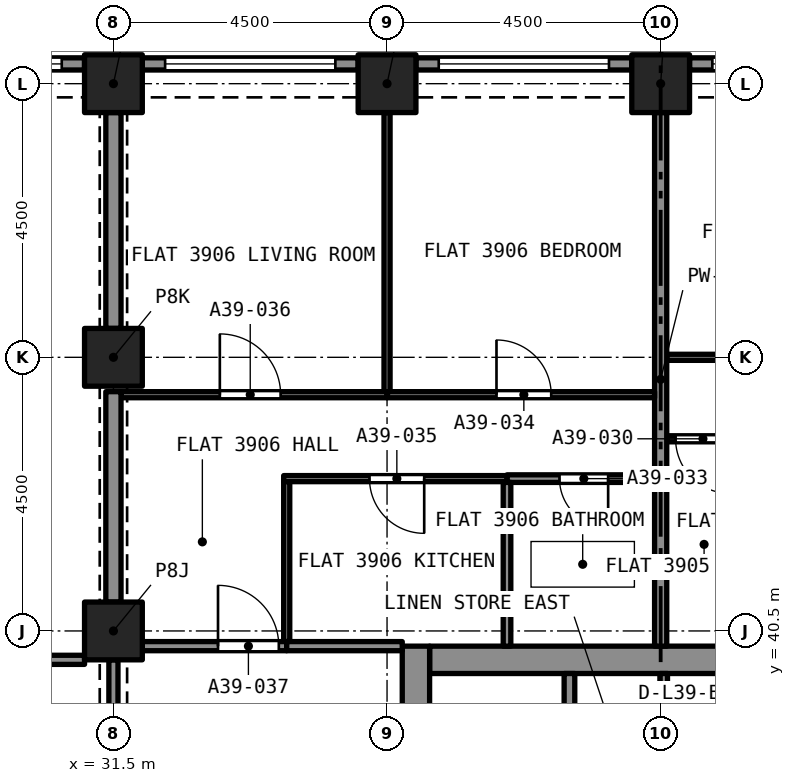
"""IFC4 building model, lengths in metres.
Left out: names, types, materials, properties, quantities, classifications, styles, units other than length and angle.
Written with IfcOpenShell. Run it as: python <this file> out.ifc"""

import sys

from ifc_helpers import new_model, si_unit, direction, frame, frame_2d, origin, origin_2d, place, context, subcontext, project, spatial, rectangle, extrude, element, fill, save


model = new_model("IFC4")
c1 = context("Model", 3, precision=1e-05, world=origin(), true_north=direction((0.0, 1.0)))
c2 = subcontext(c1, "Body", "Model", "MODEL_VIEW")
j1 = project(units=[si_unit("LENGTHUNIT", "METRE"), si_unit("PLANEANGLEUNIT", "RADIAN")], contexts=[c1])
p1 = place(None, origin())
s1 = spatial("IfcSite", under=j1, at=p1, CompositionType="ELEMENT")
p2 = place(p1, origin())
s2 = spatial("IfcBuilding", under=s1, at=p2, CompositionType="ELEMENT")
p3 = place(p2, frame((0.0, 0.0, 139.8)))
s3 = spatial("IfcBuildingStorey", under=s2, at=p3, CompositionType="ELEMENT", Elevation=139.8)
for number, where, z_axis, x_axis in (
    (1, (31.5, 40.5, 0.0), (0.0, 0.0, 1.0), (1.0, 0.0, 0.0)),
    (2, (31.5, 45.0, 0.0), (0.0, 0.0, 1.0), (1.0, 0.0, 0.0)),
    (3, (31.5, 49.5, 0.0), (0.0, 0.0, 1.0), (1.0, 0.0, 0.0)),
    (4, (36.0, 49.5, 0.0), (0.0, 0.0, 1.0), (1.0, 0.0, 0.0)),
    (5, (40.5, 49.5, 0.0), (0.0, 0.0, 1.0), (1.0, 0.0, 0.0)),
):
    element("IfcColumn", number, at=place(p3, frame(where, z_axis=z_axis, x_axis=x_axis)), inside=s3, PredefinedType="COLUMN", context=c2, shape_type="SweptSolid", body=[
        extrude(rectangle(XDim=0.95, YDim=0.95, at=origin_2d()), origin(), (0.0, 0.0, 1.0), 3.2),
    ])
p4 = place(p3, frame((36.7, 40.025, 0.0), z_axis=(0.0, 0.0, 1.0), x_axis=(1.0, 0.0, 0.0)))
e6 = element("IfcWall", 6, at=p4, inside=s3, PredefinedType="SOLIDWALL", context=c2, shape_type="SweptSolid", body=[
    extrude(rectangle(XDim=7.6, YDim=0.45, at=frame_2d((3.8, 0.0))), origin(), (0.0, 0.0, 1.0), 3.2),
])
p5 = place(p3, frame((36.475, 27.25, 0.0), z_axis=(0.0, 0.0, 1.0), x_axis=(0.0, 1.0, 0.0)))
e7 = element("IfcWall", 7, at=p5, inside=s3, PredefinedType="SOLIDWALL", context=c2, shape_type="SweptSolid", body=[
    extrude(rectangle(XDim=13.0, YDim=0.45, at=frame_2d((6.5, 0.0))), origin(), (0.0, 0.0, 1.0), 3.2),
])
p6 = place(p5, frame((8.7, 0.0, 0.0)))
e8 = element("IfcOpeningElement", 8, at=p6, cuts=e7, PredefinedType="OPENING", context=c2, shape_type="SweptSolid", body=[
    extrude(rectangle(XDim=1.2, YDim=2.1, at=frame_2d((0.6, 1.05))), frame((0.0, 0.235, 0.0), z_axis=(0.0, -1.0, 0.0), x_axis=(1.0, 0.0, 0.0)), (0.0, 0.0, 1.0), 0.47),
])
p7 = place(p3, frame((40.975, 49.825, 0.0), z_axis=(0.0, 0.0, 1.0), x_axis=(1.0, 0.0, 0.0)))
e9 = element("IfcWall", 9, at=p7, inside=s3, PredefinedType="SOLIDWALL", context=c2, shape_type="SweptSolid", body=[
    extrude(rectangle(XDim=3.55, YDim=0.2, at=frame_2d((1.775, 0.0))), origin(), (0.0, 0.0, 1.0), 3.2),
])
p8 = place(p7, frame((0.375, 0.0, 0.45)))
e10 = element("IfcOpeningElement", 10, at=p8, cuts=e9, PredefinedType="OPENING", context=c2, shape_type="SweptSolid", body=[
    extrude(rectangle(XDim=2.8, YDim=1.95, at=frame_2d((1.4, 0.975))), frame((0.0, 0.11, 0.0), z_axis=(0.0, -1.0, 0.0), x_axis=(1.0, 0.0, 0.0)), (0.0, 0.0, 1.0), 0.22),
])
p9 = place(p3, frame((36.475, 49.825, 0.0), z_axis=(0.0, 0.0, 1.0), x_axis=(1.0, 0.0, 0.0)))
e11 = element("IfcWall", 11, at=p9, inside=s3, PredefinedType="SOLIDWALL", context=c2, shape_type="SweptSolid", body=[
    extrude(rectangle(XDim=3.55, YDim=0.2, at=frame_2d((1.775, 0.0))), origin(), (0.0, 0.0, 1.0), 3.2),
])
p10 = place(p9, frame((0.375, 0.0, 0.45)))
e12 = element("IfcOpeningElement", 12, at=p10, cuts=e11, PredefinedType="OPENING", context=c2, shape_type="SweptSolid", body=[
    extrude(rectangle(XDim=2.8, YDim=1.95, at=frame_2d((1.4, 0.975))), frame((0.0, 0.11, 0.0), z_axis=(0.0, -1.0, 0.0), x_axis=(1.0, 0.0, 0.0)), (0.0, 0.0, 1.0), 0.22),
])
p11 = place(p3, frame((31.975, 49.825, 0.0), z_axis=(0.0, 0.0, 1.0), x_axis=(1.0, 0.0, 0.0)))
e13 = element("IfcWall", 13, at=p11, inside=s3, PredefinedType="SOLIDWALL", context=c2, shape_type="SweptSolid", body=[
    extrude(rectangle(XDim=3.55, YDim=0.2, at=frame_2d((1.775, 0.0))), origin(), (0.0, 0.0, 1.0), 3.2),
])
p12 = place(p11, frame((0.375, 0.0, 0.45)))
e14 = element("IfcOpeningElement", 14, at=p12, cuts=e13, PredefinedType="OPENING", context=c2, shape_type="SweptSolid", body=[
    extrude(rectangle(XDim=2.8, YDim=1.95, at=frame_2d((1.4, 0.975))), frame((0.0, 0.11, 0.0), z_axis=(0.0, -1.0, 0.0), x_axis=(1.0, 0.0, 0.0)), (0.0, 0.0, 1.0), 0.22),
])
p13 = place(p3, frame((27.475, 49.825, 0.0), z_axis=(0.0, 0.0, 1.0), x_axis=(1.0, 0.0, 0.0)))
e15 = element("IfcWall", 15, at=p13, inside=s3, PredefinedType="SOLIDWALL", context=c2, shape_type="SweptSolid", body=[
    extrude(rectangle(XDim=3.55, YDim=0.2, at=frame_2d((1.775, 0.0))), origin(), (0.0, 0.0, 1.0), 3.2),
])
p14 = place(p13, frame((0.375, 0.0, 0.45)))
e16 = element("IfcOpeningElement", 16, at=p14, cuts=e15, PredefinedType="OPENING", context=c2, shape_type="SweptSolid", body=[
    extrude(rectangle(XDim=2.8, YDim=1.95, at=frame_2d((1.4, 0.975))), frame((0.0, 0.11, 0.0), z_axis=(0.0, -1.0, 0.0), x_axis=(1.0, 0.0, 0.0)), (0.0, 0.0, 1.0), 0.22),
])
p15 = place(p3, frame((40.6, 45.0, 0.0), z_axis=(0.0, 0.0, 1.0), x_axis=(1.0, 0.0, 0.0)))
e17 = element("IfcWall", 17, at=p15, inside=s3, PredefinedType="PARTITIONING", context=c2, shape_type="SweptSolid", body=[
    extrude(rectangle(XDim=4.4, YDim=0.1, at=frame_2d((2.2, 0.0))), origin(), (0.0, 0.0, 1.0), 2.9),
])
p16 = place(p15, frame((1.7, 0.0, 0.0)))
e18 = element("IfcOpeningElement", 18, at=p16, cuts=e17, PredefinedType="OPENING", context=c2, shape_type="SweptSolid", body=[
    extrude(rectangle(XDim=0.9, YDim=2.1, at=frame_2d((0.45, 1.05))), frame((0.0, 0.06, 0.0), z_axis=(0.0, -1.0, 0.0), x_axis=(1.0, 0.0, 0.0)), (0.0, 0.0, 1.0), 0.12),
])
p17 = place(p3, frame((41.891, 43.66, 0.0), z_axis=(0.0, 0.0, 1.0), x_axis=(-1.0, 0.0, 0.0)))
e19 = element("IfcWall", 19, at=p17, inside=s3, PredefinedType="PARTITIONING", context=c2, shape_type="SweptSolid", body=[
    extrude(rectangle(XDim=1.291, YDim=0.1, at=frame_2d((0.646, 0.0))), origin(), (0.0, 0.0, 1.0), 2.9),
])
p18 = place(p17, frame((0.246, 0.0, 0.0)))
e20 = element("IfcOpeningElement", 20, at=p18, cuts=e19, PredefinedType="OPENING", context=c2, shape_type="SweptSolid", body=[
    extrude(rectangle(XDim=0.9, YDim=2.1, at=frame_2d((0.45, 1.05))), frame((0.0, 0.06, 0.0), z_axis=(0.0, -1.0, 0.0), x_axis=(1.0, 0.0, 0.0)), (0.0, 0.0, 1.0), 0.12),
])
p19 = place(p3, frame((40.5, 40.25, 0.0), z_axis=(0.0, 0.0, 1.0), x_axis=(0.0, 1.0, 0.0)))
e21 = element("IfcWall", 21, at=p19, inside=s3, PredefinedType="PARTITIONING", context=c2, shape_type="SweptSolid", body=[
    extrude(rectangle(XDim=8.775, YDim=0.2, at=frame_2d((4.387, 0.0))), origin(), (0.0, 0.0, 1.0), 2.9),
])
p20 = place(p3, frame((40.4, 43.005, 0.0), z_axis=(0.0, 0.0, 1.0), x_axis=(-1.0, 0.0, 0.0)))
e22 = element("IfcWall", 22, at=p20, inside=s3, PredefinedType="PARTITIONING", context=c2, shape_type="SweptSolid", body=[
    extrude(rectangle(XDim=2.427, YDim=0.125, at=frame_2d((1.214, 0.0))), origin(), (0.0, 0.0, 1.0), 2.9),
])
p21 = place(p20, frame((0.764, 0.0, 0.0)))
e23 = element("IfcOpeningElement", 23, at=p21, cuts=e22, PredefinedType="OPENING", context=c2, shape_type="SweptSolid", body=[
    extrude(rectangle(XDim=0.8, YDim=2.1, at=frame_2d((0.4, 1.05))), frame((0.0, 0.073, 0.0), z_axis=(0.0, -1.0, 0.0), x_axis=(1.0, 0.0, 0.0)), (0.0, 0.0, 1.0), 0.145),
])
p22 = place(p3, frame((37.973, 40.25, 0.0), z_axis=(0.0, 0.0, 1.0), x_axis=(0.0, 1.0, 0.0)))
e24 = element("IfcWall", 24, at=p22, inside=s3, PredefinedType="PARTITIONING", context=c2, shape_type="SweptSolid", body=[
    extrude(rectangle(XDim=2.692, YDim=0.125, at=frame_2d((1.346, 0.0))), origin(), (0.0, 0.0, 1.0), 2.9),
])
p23 = place(p3, frame((36.0, 44.385, 0.0), z_axis=(0.0, 0.0, 1.0), x_axis=(1.0, 0.0, 0.0)))
e25 = element("IfcWall", 25, at=p23, inside=s3, PredefinedType="PARTITIONING", context=c2, shape_type="SweptSolid", body=[
    extrude(rectangle(XDim=4.4, YDim=0.1, at=frame_2d((2.2, 0.0))), origin(), (0.0, 0.0, 1.0), 2.9),
])
p24 = place(p23, frame((1.8, 0.0, 0.0)))
e26 = element("IfcOpeningElement", 26, at=p24, cuts=e25, PredefinedType="OPENING", context=c2, shape_type="SweptSolid", body=[
    extrude(rectangle(XDim=0.9, YDim=2.1, at=frame_2d((0.45, 1.05))), frame((0.0, 0.06, 0.0), z_axis=(0.0, -1.0, 0.0), x_axis=(1.0, 0.0, 0.0)), (0.0, 0.0, 1.0), 0.12),
])
p25 = place(p3, frame((36.0, 44.435, 0.0), z_axis=(0.0, 0.0, 1.0), x_axis=(0.0, 1.0, 0.0)))
e27 = element("IfcWall", 27, at=p25, inside=s3, PredefinedType="PARTITIONING", context=c2, shape_type="SweptSolid", body=[
    extrude(rectangle(XDim=4.59, YDim=0.1, at=frame_2d((2.295, 0.0))), origin(), (0.0, 0.0, 1.0), 2.9),
])
p26 = place(p3, frame((37.973, 43.005, 0.0), z_axis=(0.0, 0.0, 1.0), x_axis=(-1.0, 0.0, 0.0)))
e28 = element("IfcWall", 28, at=p26, inside=s3, PredefinedType="PARTITIONING", context=c2, shape_type="SweptSolid", body=[
    extrude(rectangle(XDim=3.673, YDim=0.1, at=frame_2d((1.836, 0.0))), origin(), (0.0, 0.0, 1.0), 2.9),
])
p27 = place(p26, frame((1.361, 0.0, 0.0)))
e29 = element("IfcOpeningElement", 29, at=p27, cuts=e28, PredefinedType="OPENING", context=c2, shape_type="SweptSolid", body=[
    extrude(rectangle(XDim=0.9, YDim=2.1, at=frame_2d((0.45, 1.05))), frame((0.0, 0.06, 0.0), z_axis=(0.0, -1.0, 0.0), x_axis=(1.0, 0.0, 0.0)), (0.0, 0.0, 1.0), 0.12),
])
p28 = place(p3, frame((34.35, 40.325, 0.0), z_axis=(0.0, 0.0, 1.0), x_axis=(0.0, 1.0, 0.0)))
e30 = element("IfcWall", 30, at=p28, inside=s3, PredefinedType="PARTITIONING", context=c2, shape_type="SweptSolid", body=[
    extrude(rectangle(XDim=2.63, YDim=0.1, at=frame_2d((1.315, 0.0))), origin(), (0.0, 0.0, 1.0), 2.9),
])
p29 = place(p3, frame((31.625, 44.385, 0.0), z_axis=(0.0, 0.0, 1.0), x_axis=(1.0, 0.0, 0.0)))
e31 = element("IfcWall", 31, at=p29, inside=s3, PredefinedType="PARTITIONING", context=c2, shape_type="SweptSolid", body=[
    extrude(rectangle(XDim=4.375, YDim=0.1, at=frame_2d((2.188, 0.0))), origin(), (0.0, 0.0, 1.0), 2.9),
])
p30 = place(p29, frame((1.625, 0.0, 0.0)))
e32 = element("IfcOpeningElement", 32, at=p30, cuts=e31, PredefinedType="OPENING", context=c2, shape_type="SweptSolid", body=[
    extrude(rectangle(XDim=1.0, YDim=2.1, at=frame_2d((0.5, 1.05))), frame((0.0, 0.06, 0.0), z_axis=(0.0, -1.0, 0.0), x_axis=(1.0, 0.0, 0.0)), (0.0, 0.0, 1.0), 0.12),
])
p31 = place(p3, frame((31.5, 40.975, 0.0), z_axis=(0.0, 0.0, 1.0), x_axis=(0.0, 1.0, 0.0)))
e33 = element("IfcWall", 33, at=p31, inside=s3, PredefinedType="PARTITIONING", context=c2, shape_type="SweptSolid", body=[
    extrude(rectangle(XDim=3.46, YDim=0.25, at=frame_2d((1.73, 0.0))), origin(), (0.0, 0.0, 1.0), 2.38),
])
p32 = place(p3, frame((31.975, 40.25, 0.0), z_axis=(0.0, 0.0, 1.0), x_axis=(1.0, 0.0, 0.0)))
e34 = element("IfcWall", 34, at=p32, inside=s3, PredefinedType="PARTITIONING", context=c2, shape_type="SweptSolid", body=[
    extrude(rectangle(XDim=2.375, YDim=0.15, at=frame_2d((1.188, 0.0))), origin(), (0.0, 0.0, 1.0), 2.9),
])
p33 = place(p32, frame((1.245, 0.0, 0.0)))
e35 = element("IfcOpeningElement", 35, at=p33, cuts=e34, PredefinedType="OPENING", context=c2, shape_type="SweptSolid", body=[
    extrude(rectangle(XDim=1.0, YDim=2.1, at=frame_2d((0.5, 1.05))), frame((0.0, 0.085, 0.0), z_axis=(0.0, -1.0, 0.0), x_axis=(1.0, 0.0, 0.0)), (0.0, 0.0, 1.0), 0.17),
])
p34 = place(p3, frame((34.35, 40.25, 0.0), z_axis=(0.0, 0.0, 1.0), x_axis=(1.0, 0.0, 0.0)))
e36 = element("IfcWall", 36, at=p34, inside=s3, PredefinedType="PARTITIONING", context=c2, shape_type="SweptSolid", body=[
    extrude(rectangle(XDim=1.9, YDim=0.15, at=frame_2d((0.95, 0.0))), origin(), (0.0, 0.0, 1.0), 2.9),
])
p35 = place(p3, frame((31.5, 45.475, 0.0), z_axis=(0.0, 0.0, 1.0), x_axis=(0.0, 1.0, 0.0)))
e37 = element("IfcWall", 37, at=p35, inside=s3, PredefinedType="PARTITIONING", context=c2, shape_type="SweptSolid", body=[
    extrude(rectangle(XDim=3.55, YDim=0.25, at=frame_2d((1.775, 0.0))), origin(), (0.0, 0.0, 1.0), 2.38),
])
p36 = place(p3, frame((18.475, 40.025, 0.0), z_axis=(0.0, 0.0, 1.0), x_axis=(1.0, 0.0, 0.0)))
e38 = element("IfcWall", 38, at=p36, inside=s3, PredefinedType="PARTITIONING", context=c2, shape_type="SweptSolid", body=[
    extrude(rectangle(XDim=12.55, YDim=0.15, at=frame_2d((6.275, 0.0))), origin(), (0.0, 0.0, 1.0), 2.75),
])
p37 = place(p36, frame((5.775, 0.0, 0.0)))
e39 = element("IfcOpeningElement", 39, at=p37, cuts=e38, PredefinedType="OPENING", context=c2, shape_type="SweptSolid", body=[
    extrude(rectangle(XDim=1.0, YDim=2.1, at=frame_2d((0.5, 1.05))), frame((0.0, 0.085, 0.0), z_axis=(0.0, -1.0, 0.0), x_axis=(1.0, 0.0, 0.0)), (0.0, 0.0, 1.0), 0.17),
])
p38 = place(p3, frame((31.5, 36.475, 0.0), z_axis=(0.0, 0.0, 1.0), x_axis=(0.0, 1.0, 0.0)))
e40 = element("IfcWall", 40, at=p38, inside=s3, PredefinedType="PARTITIONING", context=c2, shape_type="SweptSolid", body=[
    extrude(rectangle(XDim=3.55, YDim=0.15, at=frame_2d((1.775, 0.0))), origin(), (0.0, 0.0, 1.0), 2.38),
])
p39 = place(p38, frame((1.175, 0.0, 0.0)))
e41 = element("IfcOpeningElement", 41, at=p39, cuts=e40, PredefinedType="OPENING", context=c2, shape_type="SweptSolid", body=[
    extrude(rectangle(XDim=1.2, YDim=2.1, at=frame_2d((0.6, 1.05))), frame((0.0, 0.085, 0.0), z_axis=(0.0, -1.0, 0.0), x_axis=(1.0, 0.0, 0.0)), (0.0, 0.0, 1.0), 0.17),
])
p40 = place(p3, frame((39.0, 37.5, 0.0), z_axis=(0.0, 0.0, 1.0), x_axis=(0.0, 1.0, 0.0)))
e42 = element("IfcWall", 42, at=p40, inside=s3, PredefinedType="SOLIDWALL", context=c2, shape_type="SweptSolid", body=[
    extrude(rectangle(XDim=2.3, YDim=0.175, at=frame_2d((1.15, 0.0))), origin(), (0.0, 0.0, 1.0), 2.9),
])
p41 = place(p3, frame((40.55, 37.5, 0.0), z_axis=(0.0, 0.0, 1.0), x_axis=(0.0, 1.0, 0.0)))
e43 = element("IfcWall", 43, at=p41, inside=s3, PredefinedType="PARTITIONING", context=c2, shape_type="SweptSolid", body=[
    extrude(rectangle(XDim=2.3, YDim=0.125, at=frame_2d((1.15, 0.0))), origin(), (0.0, 0.0, 1.0), 2.9),
])
p42 = place(p8, origin())
e44 = element("IfcWindow", 44, at=p42, inside=s3, PartitioningType="SINGLE_PANEL", PredefinedType="WINDOW", context=c2, shape_type="SweptSolid", body=[
    extrude(rectangle(XDim=2.8, YDim=1.95, at=frame_2d((1.4, 0.975))), frame((0.0, 0.03, 0.0), z_axis=(0.0, -1.0, 0.0), x_axis=(1.0, 0.0, 0.0)), (0.0, 0.0, 1.0), 0.06),
])
fill(e10, e44)
p43 = place(p10, origin())
e45 = element("IfcWindow", 45, at=p43, inside=s3, PartitioningType="SINGLE_PANEL", PredefinedType="WINDOW", context=c2, shape_type="SweptSolid", body=[
    extrude(rectangle(XDim=2.8, YDim=1.95, at=frame_2d((1.4, 0.975))), frame((0.0, 0.03, 0.0), z_axis=(0.0, -1.0, 0.0), x_axis=(1.0, 0.0, 0.0)), (0.0, 0.0, 1.0), 0.06),
])
fill(e12, e45)
p44 = place(p12, origin())
e46 = element("IfcWindow", 46, at=p44, inside=s3, PartitioningType="SINGLE_PANEL", PredefinedType="WINDOW", context=c2, shape_type="SweptSolid", body=[
    extrude(rectangle(XDim=2.8, YDim=1.95, at=frame_2d((1.4, 0.975))), frame((0.0, 0.03, 0.0), z_axis=(0.0, -1.0, 0.0), x_axis=(1.0, 0.0, 0.0)), (0.0, 0.0, 1.0), 0.06),
])
fill(e14, e46)
p45 = place(p14, origin())
e47 = element("IfcWindow", 47, at=p45, inside=s3, PartitioningType="SINGLE_PANEL", PredefinedType="WINDOW", context=c2, shape_type="SweptSolid", body=[
    extrude(rectangle(XDim=2.8, YDim=1.95, at=frame_2d((1.4, 0.975))), frame((0.0, 0.03, 0.0), z_axis=(0.0, -1.0, 0.0), x_axis=(1.0, 0.0, 0.0)), (0.0, 0.0, 1.0), 0.06),
])
fill(e16, e47)
p46 = place(p18, origin())
e48 = element("IfcDoor", 48, at=p46, inside=s3, OperationType="SINGLE_SWING_RIGHT", PredefinedType="DOOR", context=c2, shape_type="SweptSolid", body=[
    extrude(rectangle(XDim=0.9, YDim=2.1, at=frame_2d((0.45, 1.05))), frame((0.0, 0.025, 0.0), z_axis=(0.0, -1.0, 0.0), x_axis=(1.0, 0.0, 0.0)), (0.0, 0.0, 1.0), 0.05),
])
fill(e20, e48)
p47 = place(p21, origin())
e49 = element("IfcDoor", 49, at=p47, inside=s3, OperationType="SINGLE_SWING_LEFT", PredefinedType="DOOR", context=c2, shape_type="SweptSolid", body=[
    extrude(rectangle(XDim=0.8, YDim=2.1, at=frame_2d((0.4, 1.05))), frame((0.0, 0.025, 0.0), z_axis=(0.0, -1.0, 0.0), x_axis=(1.0, 0.0, 0.0)), (0.0, 0.0, 1.0), 0.05),
])
fill(e23, e49)
p48 = place(p24, origin())
e50 = element("IfcDoor", 50, at=p48, inside=s3, OperationType="SINGLE_SWING_RIGHT", PredefinedType="DOOR", context=c2, shape_type="SweptSolid", body=[
    extrude(rectangle(XDim=0.9, YDim=2.1, at=frame_2d((0.45, 1.05))), frame((0.0, 0.025, 0.0), z_axis=(0.0, -1.0, 0.0), x_axis=(1.0, 0.0, 0.0)), (0.0, 0.0, 1.0), 0.05),
])
fill(e26, e50)
p49 = place(p27, origin())
e51 = element("IfcDoor", 51, at=p49, inside=s3, OperationType="SINGLE_SWING_LEFT", PredefinedType="DOOR", context=c2, shape_type="SweptSolid", body=[
    extrude(rectangle(XDim=0.9, YDim=2.1, at=frame_2d((0.45, 1.05))), frame((0.0, 0.025, 0.0), z_axis=(0.0, -1.0, 0.0), x_axis=(1.0, 0.0, 0.0)), (0.0, 0.0, 1.0), 0.05),
])
fill(e29, e51)
p50 = place(p30, origin())
e52 = element("IfcDoor", 52, at=p50, inside=s3, OperationType="SINGLE_SWING_LEFT", PredefinedType="DOOR", context=c2, shape_type="SweptSolid", body=[
    extrude(rectangle(XDim=1.0, YDim=2.1, at=frame_2d((0.5, 1.05))), frame((0.0, 0.025, 0.0), z_axis=(0.0, -1.0, 0.0), x_axis=(1.0, 0.0, 0.0)), (0.0, 0.0, 1.0), 0.05),
])
fill(e32, e52)
p51 = place(p33, origin())
e53 = element("IfcDoor", 53, at=p51, inside=s3, OperationType="SINGLE_SWING_RIGHT", PredefinedType="DOOR", context=c2, shape_type="SweptSolid", body=[
    extrude(rectangle(XDim=1.0, YDim=2.1, at=frame_2d((0.5, 1.05))), frame((0.0, 0.025, 0.0), z_axis=(0.0, -1.0, 0.0), x_axis=(1.0, 0.0, 0.0)), (0.0, 0.0, 1.0), 0.05),
])
fill(e35, e53)
save(model, sys.argv[1])
